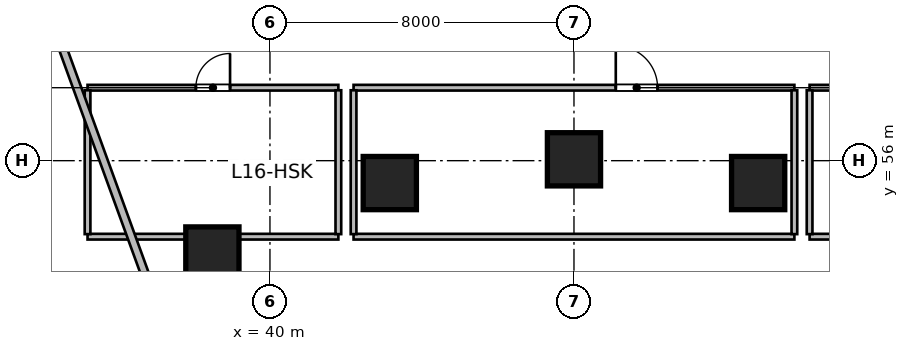
"""IFC4 building model, lengths in metres.
Left out: names, types, materials, properties, quantities, classifications, styles, units other than length and angle.
Written with IfcOpenShell. Run it as: python <this file> out.ifc"""

import sys

from ifc_helpers import new_model, si_unit, direction, frame, frame_2d, origin, origin_2d, place, context, subcontext, project, spatial, rectangle, circle, extrude, source, transform, mapped, element, fill, save


model = new_model("IFC4")
c1 = context("Model", 3, precision=1e-05, world=origin(), true_north=direction((0.0, 1.0)))
c2 = subcontext(c1, "Body", "Model", "MODEL_VIEW")
j1 = project(units=[si_unit("LENGTHUNIT", "METRE"), si_unit("PLANEANGLEUNIT", "RADIAN")], contexts=[c1])
p1 = place(None, origin())
s1 = spatial("IfcSite", under=j1, at=p1, CompositionType="ELEMENT")
p2 = place(p1, origin())
s2 = spatial("IfcBuilding", under=s1, at=p2, CompositionType="ELEMENT")
p3 = place(p2, frame((0.0, 0.0, 71.4)))
s3 = spatial("IfcBuildingStorey", under=s2, at=p3, CompositionType="ELEMENT", Elevation=71.4)
m1 = source(origin(), c2, "Body", "SweptSolid", [
    extrude(circle(Radius=0.7, at=origin_2d()), origin(), (0.0, 0.0, 1.0), 3.6),
])
for number, where, z_axis, x_axis in (
    (1, (38.485, 53.558, 0.0), (0.0, 0.0, 1.0), (-0.289, 0.957, 0.0)),
    (2, (43.154, 55.411, 0.0), (0.0, 0.0, 1.0), (-0.143, 0.99, 0.0)),
    (3, (48.0, 56.036, 0.0), (0.0, 0.0, 1.0), (0.0, 1.0, 0.0)),
    (4, (52.846, 55.411, 0.0), (0.0, 0.0, 1.0), (0.143, 0.99, 0.0)),
):
    element("IfcColumn", number, at=place(p3, frame(where, z_axis=z_axis, x_axis=x_axis)), inside=s3, PredefinedType="COLUMN", context=c2, shape_type="MappedRepresentation", body=[
        mapped(m1, transform((0.0, 0.0, 0.0), scale=1.0)),
    ])
m2 = source(origin(), c2, "Body", "SweptSolid", [
    extrude(rectangle(XDim=6.6, YDim=0.15, at=frame_2d((3.3, 0.0))), origin(), (0.0, 0.0, 1.0), 2.803),
])
p4 = place(p3, frame((35.2, 54.0, 0.0), z_axis=(0.0, 0.0, 1.0), x_axis=(1.0, 0.0, 0.0)))
e5 = element("IfcWall", 5, at=p4, inside=s3, PredefinedType="PARTITIONING", context=c2, shape_type="MappedRepresentation", body=[
    mapped(m2, transform((0.0, 0.0, 0.0), scale=1.0)),
])
m3 = source(origin(), c2, "Body", "SweptSolid", [
    extrude(rectangle(XDim=6.6, YDim=0.15, at=frame_2d((3.3, 0.0))), origin(), (0.0, 0.0, 1.0), 3.36),
])
p5 = place(p3, frame((35.2, 57.92, 0.0), z_axis=(0.0, 0.0, 1.0), x_axis=(1.0, 0.0, 0.0)))
e6 = element("IfcWall", 6, at=p5, inside=s3, PredefinedType="PARTITIONING", context=c2, shape_type="MappedRepresentation", body=[
    mapped(m3, transform((0.0, 0.0, 0.0), scale=1.0)),
])
p6 = place(p5, frame((2.85, 0.0, 0.0)))
e7 = element("IfcOpeningElement", 7, at=p6, cuts=e6, PredefinedType="OPENING", context=c2, shape_type="SweptSolid", body=[
    extrude(rectangle(XDim=0.9, YDim=2.1, at=frame_2d((0.45, 1.05))), frame((0.0, 0.085, 0.0), z_axis=(0.0, -1.0, 0.0), x_axis=(1.0, 0.0, 0.0)), (0.0, 0.0, 1.0), 0.17),
])
m4 = source(origin(), c2, "Body", "SweptSolid", [
    extrude(rectangle(XDim=3.785, YDim=0.15, at=frame_2d((1.893, 0.0))), origin(), (0.0, 0.0, 1.0), 3.36),
])
for number, where, z_axis, x_axis in (
    (8, (35.2, 54.067, 0.0), (0.0, 0.0, 1.0), (0.0, 1.0, 0.0)),
    (9, (41.8, 54.067, 0.0), (0.0, 0.0, 1.0), (0.0, 1.0, 0.0)),
):
    element("IfcWall", number, at=place(p3, frame(where, z_axis=z_axis, x_axis=x_axis)), inside=s3, PredefinedType="PARTITIONING", context=c2, shape_type="MappedRepresentation", body=[
        mapped(m4, transform((0.0, 0.0, 0.0), scale=1.0)),
    ])
m5 = source(origin(), c2, "Body", "SweptSolid", [
    extrude(rectangle(XDim=11.6, YDim=0.15, at=frame_2d((5.8, 0.0))), origin(), (0.0, 0.0, 1.0), 3.36),
])
p7 = place(p3, frame((42.2, 54.0, 0.0), z_axis=(0.0, 0.0, 1.0), x_axis=(1.0, 0.0, 0.0)))
e10 = element("IfcWall", 10, at=p7, inside=s3, PredefinedType="PARTITIONING", context=c2, shape_type="MappedRepresentation", body=[
    mapped(m5, transform((0.0, 0.0, 0.0), scale=1.0)),
])
p8 = place(p3, frame((42.2, 57.92, 0.0), z_axis=(0.0, 0.0, 1.0), x_axis=(1.0, 0.0, 0.0)))
e11 = element("IfcWall", 11, at=p8, inside=s3, PredefinedType="PARTITIONING", context=c2, shape_type="MappedRepresentation", body=[
    mapped(m5, transform((0.0, 0.0, 0.0), scale=1.0)),
])
p9 = place(p8, frame((6.9, 0.0, 0.0)))
e12 = element("IfcOpeningElement", 12, at=p9, cuts=e11, PredefinedType="OPENING", context=c2, shape_type="SweptSolid", body=[
    extrude(rectangle(XDim=1.1, YDim=2.15, at=frame_2d((0.55, 1.075))), frame((0.0, 0.085, 0.0), z_axis=(0.0, -1.0, 0.0), x_axis=(1.0, 0.0, 0.0)), (0.0, 0.0, 1.0), 0.17),
])
for number, where, z_axis, x_axis in (
    (13, (42.2, 54.067, 0.0), (0.0, 0.0, 1.0), (0.0, 1.0, 0.0)),
    (14, (53.8, 54.067, 0.0), (0.0, 0.0, 1.0), (0.0, 1.0, 0.0)),
):
    element("IfcWall", number, at=place(p3, frame(where, z_axis=z_axis, x_axis=x_axis)), inside=s3, PredefinedType="PARTITIONING", context=c2, shape_type="MappedRepresentation", body=[
        mapped(m4, transform((0.0, 0.0, 0.0), scale=1.0)),
    ])
p10 = place(p3, frame((54.2, 54.0, 0.0), z_axis=(0.0, 0.0, 1.0), x_axis=(1.0, 0.0, 0.0)))
e15 = element("IfcWall", 15, at=p10, inside=s3, PredefinedType="PARTITIONING", context=c2, shape_type="MappedRepresentation", body=[
    mapped(m2, transform((0.0, 0.0, 0.0), scale=1.0)),
])
p11 = place(p3, frame((54.2, 57.92, 0.0), z_axis=(0.0, 0.0, 1.0), x_axis=(1.0, 0.0, 0.0)))
e16 = element("IfcWall", 16, at=p11, inside=s3, PredefinedType="PARTITIONING", context=c2, shape_type="MappedRepresentation", body=[
    mapped(m3, transform((0.0, 0.0, 0.0), scale=1.0)),
])
p12 = place(p11, frame((2.825, 0.0, 0.0)))
e17 = element("IfcOpeningElement", 17, at=p12, cuts=e16, PredefinedType="OPENING", context=c2, shape_type="SweptSolid", body=[
    extrude(rectangle(XDim=0.95, YDim=2.1, at=frame_2d((0.475, 1.05))), frame((0.0, 0.085, 0.0), z_axis=(0.0, -1.0, 0.0), x_axis=(1.0, 0.0, 0.0)), (0.0, 0.0, 1.0), 0.17),
])
p13 = place(p3, frame((54.2, 54.067, 0.0), z_axis=(0.0, 0.0, 1.0), x_axis=(0.0, 1.0, 0.0)))
e18 = element("IfcWall", 18, at=p13, inside=s3, PredefinedType="PARTITIONING", context=c2, shape_type="MappedRepresentation", body=[
    mapped(m4, transform((0.0, 0.0, 0.0), scale=1.0)),
])
m6 = source(origin(), c2, "Body", "SweptSolid", [
    extrude(rectangle(XDim=12.196, YDim=0.21, at=frame_2d((6.098, 0.0))), origin(), (0.0, 0.0, 1.0), 3.36),
])
p14 = place(p3, frame((38.258, 48.766, 0.0), z_axis=(0.0, 0.0, 1.0), x_axis=(-0.342022711534, 0.939691686031, 0.0)))
e19 = element("IfcWall", 19, at=p14, inside=s3, PredefinedType="PARTITIONING", context=c2, shape_type="MappedRepresentation", body=[
    mapped(m6, transform((0.0, 0.0, 0.0), scale=1.0)),
])
m7 = source(origin(), c2, "Body", "SweptSolid", [
    extrude(rectangle(XDim=0.9, YDim=2.1, at=frame_2d((0.45, 1.05))), frame((0.0, 0.025, 0.0), z_axis=(0.0, -1.0, 0.0), x_axis=(1.0, 0.0, 0.0)), (0.0, 0.0, 1.0), 0.05),
])
p15 = place(p6, origin())
e20 = element("IfcDoor", 20, at=p15, inside=s3, OperationType="SINGLE_SWING_RIGHT", PredefinedType="DOOR", context=c2, shape_type="MappedRepresentation", body=[
    mapped(m7, transform((0.0, 0.0, 0.0), scale=1.0)),
])
fill(e7, e20)
m8 = source(origin(), c2, "Body", "SweptSolid", [
    extrude(rectangle(XDim=1.1, YDim=2.15, at=frame_2d((0.55, 1.075))), frame((0.0, 0.025, 0.0), z_axis=(0.0, -1.0, 0.0), x_axis=(1.0, 0.0, 0.0)), (0.0, 0.0, 1.0), 0.05),
])
p16 = place(p9, origin())
e21 = element("IfcDoor", 21, at=p16, inside=s3, OperationType="SINGLE_SWING_LEFT", PredefinedType="DOOR", context=c2, shape_type="MappedRepresentation", body=[
    mapped(m8, transform((0.0, 0.0, 0.0), scale=1.0)),
])
fill(e12, e21)
save(model, sys.argv[1])
